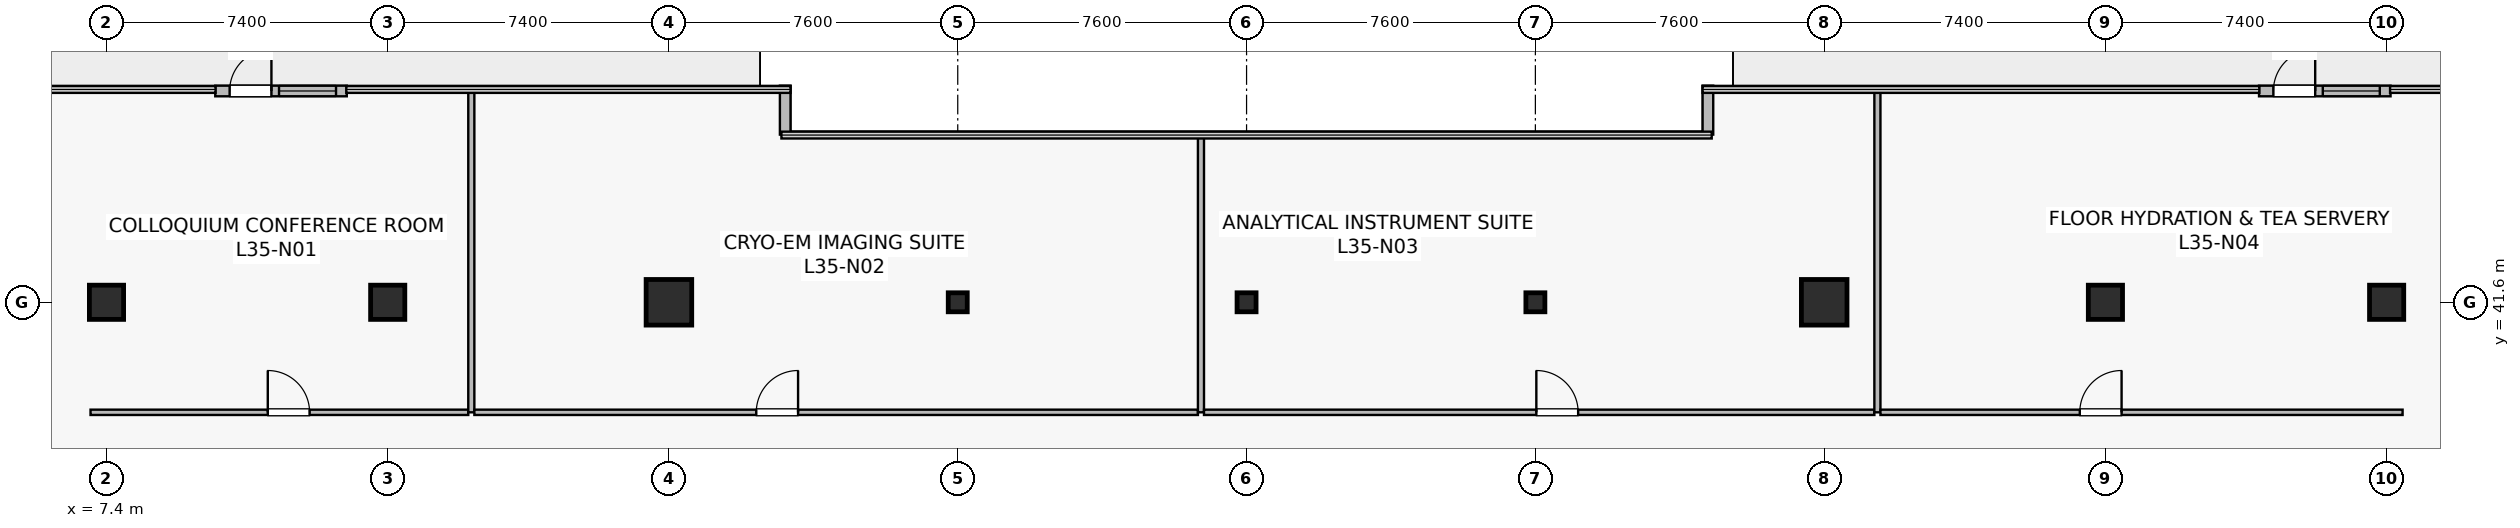
"""IFC4 building model, lengths in metres.
Left out: names, types, materials, properties, quantities, classifications, styles, units other than length and angle.
Written with IfcOpenShell. Run it as: python <this file> out.ifc"""

import sys

from ifc_helpers import new_model, si_unit, direction, frame, frame_2d, origin, origin_2d, place, context, subcontext, project, spatial, rectangle, hollow_rectangle, extrude, source, transform, mapped, element, fill, save


model = new_model("IFC4")
c1 = context("Model", 3, precision=1e-05, world=origin(), true_north=direction((0.0, 1.0)))
c2 = subcontext(c1, "Body", "Model", "MODEL_VIEW")
j1 = project(units=[si_unit("LENGTHUNIT", "METRE"), si_unit("PLANEANGLEUNIT", "RADIAN")], contexts=[c1])
p1 = place(None, origin())
s1 = spatial("IfcSite", under=j1, at=p1, CompositionType="ELEMENT")
p2 = place(p1, origin())
s2 = spatial("IfcBuilding", under=s1, at=p2, CompositionType="ELEMENT")
p3 = place(p2, frame((0.0, 0.0, 146.1)))
s3 = spatial("IfcBuildingStorey", under=s2, at=p3, CompositionType="ELEMENT", Elevation=146.1)
m1 = source(origin(), c2, "Body", "SweptSolid", [
    extrude(rectangle(XDim=0.9, YDim=0.9, at=origin_2d()), origin(), (0.0, 0.0, 1.0), 4.1),
])
p4 = place(p3, frame((14.8, 41.6, 0.0), z_axis=(0.0, 0.0, 1.0), x_axis=(1.0, 0.0, 0.0)))
e1 = element("IfcColumn", 1, at=p4, inside=s3, PredefinedType="COLUMN", context=c2, shape_type="MappedRepresentation", body=[
    mapped(m1, transform((0.0, 0.0, 0.0), scale=1.0)),
])
m2 = source(origin(), c2, "Body", "SweptSolid", [
    extrude(rectangle(XDim=1.2, YDim=1.2, at=origin_2d()), origin(), (0.0, 0.0, 1.0), 4.1),
])
for number, where, z_axis, x_axis in (
    (2, (22.2, 41.6, 0.0), (0.0, 0.0, 1.0), (1.0, 0.0, 0.0)),
    (3, (52.6, 41.6, 0.0), (0.0, 0.0, 1.0), (1.0, 0.0, 0.0)),
):
    element("IfcColumn", number, at=place(p3, frame(where, z_axis=z_axis, x_axis=x_axis)), inside=s3, PredefinedType="COLUMN", context=c2, shape_type="MappedRepresentation", body=[
        mapped(m2, transform((0.0, 0.0, 0.0), scale=1.0)),
    ])
for number, where, z_axis, x_axis in (
    (4, (60.0, 41.6, 0.0), (0.0, 0.0, 1.0), (1.0, 0.0, 0.0)),
    (5, (7.4, 41.6, 0.0), (0.0, 0.0, 1.0), (1.0, 0.0, 0.0)),
    (6, (67.4, 41.6, 0.0), (0.0, 0.0, 1.0), (1.0, 0.0, 0.0)),
):
    element("IfcColumn", number, at=place(p3, frame(where, z_axis=z_axis, x_axis=x_axis)), inside=s3, PredefinedType="COLUMN", context=c2, shape_type="MappedRepresentation", body=[
        mapped(m1, transform((0.0, 0.0, 0.0), scale=1.0)),
    ])
m3 = source(origin(), c2, "Body", "SweptSolid", [
    extrude(hollow_rectangle(XDim=0.5, YDim=0.5, WallThickness=0.022, at=origin_2d()), origin(), (0.0, 0.0, 1.0), 4.1),
])
for number, where, z_axis, x_axis in (
    (7, (29.8, 41.6, 0.0), (0.0, 0.0, 1.0), (1.0, 0.0, 0.0)),
    (8, (37.4, 41.6, 0.0), (0.0, 0.0, 1.0), (1.0, 0.0, 0.0)),
    (9, (45.0, 41.6, 0.0), (0.0, 0.0, 1.0), (1.0, 0.0, 0.0)),
):
    element("IfcColumn", number, at=place(p3, frame(where, z_axis=z_axis, x_axis=x_axis)), inside=s3, PredefinedType="COLUMN", context=c2, shape_type="MappedRepresentation", body=[
        mapped(m3, transform((0.0, 0.0, 0.0), scale=1.0)),
    ])
p5 = place(p3, frame((10.262, 47.16, 0.0), z_axis=(0.0, 0.0, 1.0), x_axis=(1.0, 0.0, 0.0)))
e10 = element("IfcWall", 10, at=p5, inside=s3, PredefinedType="STANDARD", context=c2, shape_type="SweptSolid", body=[
    extrude(rectangle(XDim=3.461, YDim=0.28, at=frame_2d((1.73, 0.0))), origin(), (0.0, 0.0, 1.0), 3.79),
])
p6 = place(p5, frame((0.378, 0.0, 0.0)))
e11 = element("IfcOpeningElement", 11, at=p6, cuts=e10, PredefinedType="OPENING", context=c2, shape_type="SweptSolid", body=[
    extrude(rectangle(XDim=1.1, YDim=2.2, at=frame_2d((0.55, 1.1))), frame((0.0, 0.15, 0.0), z_axis=(0.0, -1.0, 0.0), x_axis=(1.0, 0.0, 0.0)), (0.0, 0.0, 1.0), 0.3),
])
p7 = place(p5, frame((1.678, 0.0, 0.9)))
e12 = element("IfcOpeningElement", 12, at=p7, cuts=e10, PredefinedType="OPENING", context=c2, shape_type="SweptSolid", body=[
    extrude(rectangle(XDim=1.5, YDim=2.2, at=frame_2d((0.75, 1.1))), frame((0.0, 0.15, 0.0), z_axis=(0.0, -1.0, 0.0), x_axis=(1.0, 0.0, 0.0)), (0.0, 0.0, 1.0), 0.3),
])
p8 = place(p3, frame((64.042, 47.16, 0.0), z_axis=(0.0, 0.0, 1.0), x_axis=(1.0, 0.0, 0.0)))
e13 = element("IfcWall", 13, at=p8, inside=s3, PredefinedType="STANDARD", context=c2, shape_type="SweptSolid", body=[
    extrude(rectangle(XDim=3.461, YDim=0.28, at=frame_2d((1.73, 0.0))), origin(), (0.0, 0.0, 1.0), 3.79),
])
p9 = place(p8, frame((0.378, 0.0, 0.0)))
e14 = element("IfcOpeningElement", 14, at=p9, cuts=e13, PredefinedType="OPENING", context=c2, shape_type="SweptSolid", body=[
    extrude(rectangle(XDim=1.1, YDim=2.2, at=frame_2d((0.55, 1.1))), frame((0.0, 0.15, 0.0), z_axis=(0.0, -1.0, 0.0), x_axis=(1.0, 0.0, 0.0)), (0.0, 0.0, 1.0), 0.3),
])
p10 = place(p8, frame((1.678, 0.0, 0.9)))
e15 = element("IfcOpeningElement", 15, at=p10, cuts=e13, PredefinedType="OPENING", context=c2, shape_type="SweptSolid", body=[
    extrude(rectangle(XDim=1.5, YDim=2.2, at=frame_2d((0.75, 1.1))), frame((0.0, 0.15, 0.0), z_axis=(0.0, -1.0, 0.0), x_axis=(1.0, 0.0, 0.0)), (0.0, 0.0, 1.0), 0.3),
])
for number, where, z_axis, x_axis in (
    (16, (49.54, 47.3, 0.0), (0.0, 0.0, 1.0), (0.0, -1.0, 0.0)),
    (17, (25.26, 46.012, 0.0), (0.0, 0.0, 1.0), (0.0, 1.0, 0.0)),
):
    element("IfcWall", number, at=place(p3, frame(where, z_axis=z_axis, x_axis=x_axis)), inside=s3, PredefinedType="STANDARD", context=c2, shape_type="SweptSolid", body=[
        extrude(rectangle(XDim=1.288, YDim=0.28, at=frame_2d((0.644, 0.0))), origin(), (0.0, 0.0, 1.0), 3.79),
    ])
p11 = place(p3, frame((6.98, 38.705, 0.0), z_axis=(0.0, 0.0, 1.0), x_axis=(1.0, 0.0, 0.0)))
e18 = element("IfcWall", 18, at=p11, inside=s3, PredefinedType="PARTITIONING", context=c2, shape_type="SweptSolid", body=[
    extrude(rectangle(XDim=9.94, YDim=0.14, at=frame_2d((4.97, 0.0))), origin(), (0.0, 0.0, 1.0), 3.125),
])
p12 = place(p11, frame((4.664, 0.0, 0.0)))
e19 = element("IfcOpeningElement", 19, at=p12, cuts=e18, PredefinedType="OPENING", context=c2, shape_type="SweptSolid", body=[
    extrude(rectangle(XDim=1.1, YDim=2.18, at=frame_2d((0.55, 1.09))), frame((0.0, 0.08, 0.0), z_axis=(0.0, -1.0, 0.0), x_axis=(1.0, 0.0, 0.0)), (0.0, 0.0, 1.0), 0.16),
])
p13 = place(p3, frame((17.0, 38.705, 0.0), z_axis=(0.0, 0.0, 1.0), x_axis=(0.0, 1.0, 0.0)))
e20 = element("IfcWall", 20, at=p13, inside=s3, PredefinedType="PARTITIONING", context=c2, shape_type="SweptSolid", body=[
    extrude(rectangle(XDim=8.485, YDim=0.16, at=frame_2d((4.242, 0.0))), origin(), (0.0, 0.0, 1.0), 3.075),
])
p14 = place(p3, frame((17.08, 38.705, 0.0), z_axis=(0.0, 0.0, 1.0), x_axis=(1.0, 0.0, 0.0)))
e21 = element("IfcWall", 21, at=p14, inside=s3, PredefinedType="PARTITIONING", context=c2, shape_type="SweptSolid", body=[
    extrude(rectangle(XDim=19.04, YDim=0.14, at=frame_2d((9.52, 0.0))), origin(), (0.0, 0.0, 1.0), 3.125),
])
p15 = place(p14, frame((7.418, 0.0, 0.0)))
e22 = element("IfcOpeningElement", 22, at=p15, cuts=e21, PredefinedType="OPENING", context=c2, shape_type="SweptSolid", body=[
    extrude(rectangle(XDim=1.1, YDim=2.18, at=frame_2d((0.55, 1.09))), frame((0.0, 0.08, 0.0), z_axis=(0.0, -1.0, 0.0), x_axis=(1.0, 0.0, 0.0)), (0.0, 0.0, 1.0), 0.16),
])
p16 = place(p3, frame((36.2, 38.705, 0.0), z_axis=(0.0, 0.0, 1.0), x_axis=(0.0, 1.0, 0.0)))
e23 = element("IfcWall", 23, at=p16, inside=s3, PredefinedType="PARTITIONING", context=c2, shape_type="SweptSolid", body=[
    extrude(rectangle(XDim=7.285, YDim=0.16, at=frame_2d((3.643, 0.0))), origin(), (0.0, 0.0, 1.0), 3.075),
])
p17 = place(p3, frame((36.28, 38.705, 0.0), z_axis=(0.0, 0.0, 1.0), x_axis=(1.0, 0.0, 0.0)))
e24 = element("IfcWall", 24, at=p17, inside=s3, PredefinedType="PARTITIONING", context=c2, shape_type="SweptSolid", body=[
    extrude(rectangle(XDim=17.64, YDim=0.14, at=frame_2d((8.82, 0.0))), origin(), (0.0, 0.0, 1.0), 3.125),
])
p18 = place(p17, frame((8.745, 0.0, 0.0)))
e25 = element("IfcOpeningElement", 25, at=p18, cuts=e24, PredefinedType="OPENING", context=c2, shape_type="SweptSolid", body=[
    extrude(rectangle(XDim=1.1, YDim=2.18, at=frame_2d((0.55, 1.09))), frame((0.0, 0.08, 0.0), z_axis=(0.0, -1.0, 0.0), x_axis=(1.0, 0.0, 0.0)), (0.0, 0.0, 1.0), 0.16),
])
p19 = place(p3, frame((54.0, 38.705, 0.0), z_axis=(0.0, 0.0, 1.0), x_axis=(0.0, 1.0, 0.0)))
e26 = element("IfcWall", 26, at=p19, inside=s3, PredefinedType="PARTITIONING", context=c2, shape_type="SweptSolid", body=[
    extrude(rectangle(XDim=8.485, YDim=0.16, at=frame_2d((4.242, 0.0))), origin(), (0.0, 0.0, 1.0), 3.075),
])
p20 = place(p3, frame((54.08, 38.705, 0.0), z_axis=(0.0, 0.0, 1.0), x_axis=(1.0, 0.0, 0.0)))
e27 = element("IfcWall", 27, at=p20, inside=s3, PredefinedType="PARTITIONING", context=c2, shape_type="SweptSolid", body=[
    extrude(rectangle(XDim=13.74, YDim=0.14, at=frame_2d((6.87, 0.0))), origin(), (0.0, 0.0, 1.0), 3.125),
])
p21 = place(p20, frame((5.245, 0.0, 0.0)))
e28 = element("IfcOpeningElement", 28, at=p21, cuts=e27, PredefinedType="OPENING", context=c2, shape_type="SweptSolid", body=[
    extrude(rectangle(XDim=1.1, YDim=2.18, at=frame_2d((0.55, 1.09))), frame((0.0, 0.08, 0.0), z_axis=(0.0, -1.0, 0.0), x_axis=(1.0, 0.0, 0.0)), (0.0, 0.0, 1.0), 0.16),
])
m4 = source(origin(), c2, "Body", "SweptSolid", [
    extrude(rectangle(XDim=1.1, YDim=2.2, at=frame_2d((0.55, 1.1))), frame((0.0, 0.025, 0.0), z_axis=(0.0, -1.0, 0.0), x_axis=(1.0, 0.0, 0.0)), (0.0, 0.0, 1.0), 0.05),
])
p22 = place(p6, origin())
e29 = element("IfcDoor", 29, at=p22, inside=s3, OperationType="SINGLE_SWING_RIGHT", PredefinedType="DOOR", context=c2, shape_type="MappedRepresentation", body=[
    mapped(m4, transform((0.0, 0.0, 0.0), scale=1.0)),
])
fill(e11, e29)
m5 = source(origin(), c2, "Body", "SweptSolid", [
    extrude(rectangle(XDim=1.5, YDim=2.2, at=frame_2d((0.75, 1.1))), frame((0.0, 0.03, 0.0), z_axis=(0.0, -1.0, 0.0), x_axis=(1.0, 0.0, 0.0)), (0.0, 0.0, 1.0), 0.06),
])
p23 = place(p7, origin())
e30 = element("IfcWindow", 30, at=p23, inside=s3, PartitioningType="SINGLE_PANEL", PredefinedType="WINDOW", context=c2, shape_type="MappedRepresentation", body=[
    mapped(m5, transform((0.0, 0.0, 0.0), scale=1.0)),
])
fill(e12, e30)
p24 = place(p9, origin())
e31 = element("IfcDoor", 31, at=p24, inside=s3, OperationType="SINGLE_SWING_RIGHT", PredefinedType="DOOR", context=c2, shape_type="MappedRepresentation", body=[
    mapped(m4, transform((0.0, 0.0, 0.0), scale=1.0)),
])
fill(e14, e31)
p25 = place(p10, origin())
e32 = element("IfcWindow", 32, at=p25, inside=s3, PartitioningType="SINGLE_PANEL", PredefinedType="WINDOW", context=c2, shape_type="MappedRepresentation", body=[
    mapped(m5, transform((0.0, 0.0, 0.0), scale=1.0)),
])
fill(e15, e32)
m6 = source(origin(), c2, "Body", "SweptSolid", [
    extrude(rectangle(XDim=1.1, YDim=2.18, at=frame_2d((0.55, 1.09))), frame((0.0, 0.025, 0.0), z_axis=(0.0, -1.0, 0.0), x_axis=(1.0, 0.0, 0.0)), (0.0, 0.0, 1.0), 0.05),
])
p26 = place(p12, origin())
e33 = element("IfcDoor", 33, at=p26, inside=s3, OperationType="SINGLE_SWING_LEFT", PredefinedType="DOOR", context=c2, shape_type="MappedRepresentation", body=[
    mapped(m6, transform((0.0, 0.0, 0.0), scale=1.0)),
])
fill(e19, e33)
p27 = place(p15, origin())
e34 = element("IfcDoor", 34, at=p27, inside=s3, OperationType="SINGLE_SWING_RIGHT", PredefinedType="DOOR", context=c2, shape_type="MappedRepresentation", body=[
    mapped(m6, transform((0.0, 0.0, 0.0), scale=1.0)),
])
fill(e22, e34)
p28 = place(p18, origin())
e35 = element("IfcDoor", 35, at=p28, inside=s3, OperationType="SINGLE_SWING_LEFT", PredefinedType="DOOR", context=c2, shape_type="MappedRepresentation", body=[
    mapped(m6, transform((0.0, 0.0, 0.0), scale=1.0)),
])
fill(e25, e35)
p29 = place(p21, origin())
e36 = element("IfcDoor", 36, at=p29, inside=s3, OperationType="SINGLE_SWING_RIGHT", PredefinedType="DOOR", context=c2, shape_type="MappedRepresentation", body=[
    mapped(m6, transform((0.0, 0.0, 0.0), scale=1.0)),
])
fill(e28, e36)
save(model, sys.argv[1])
